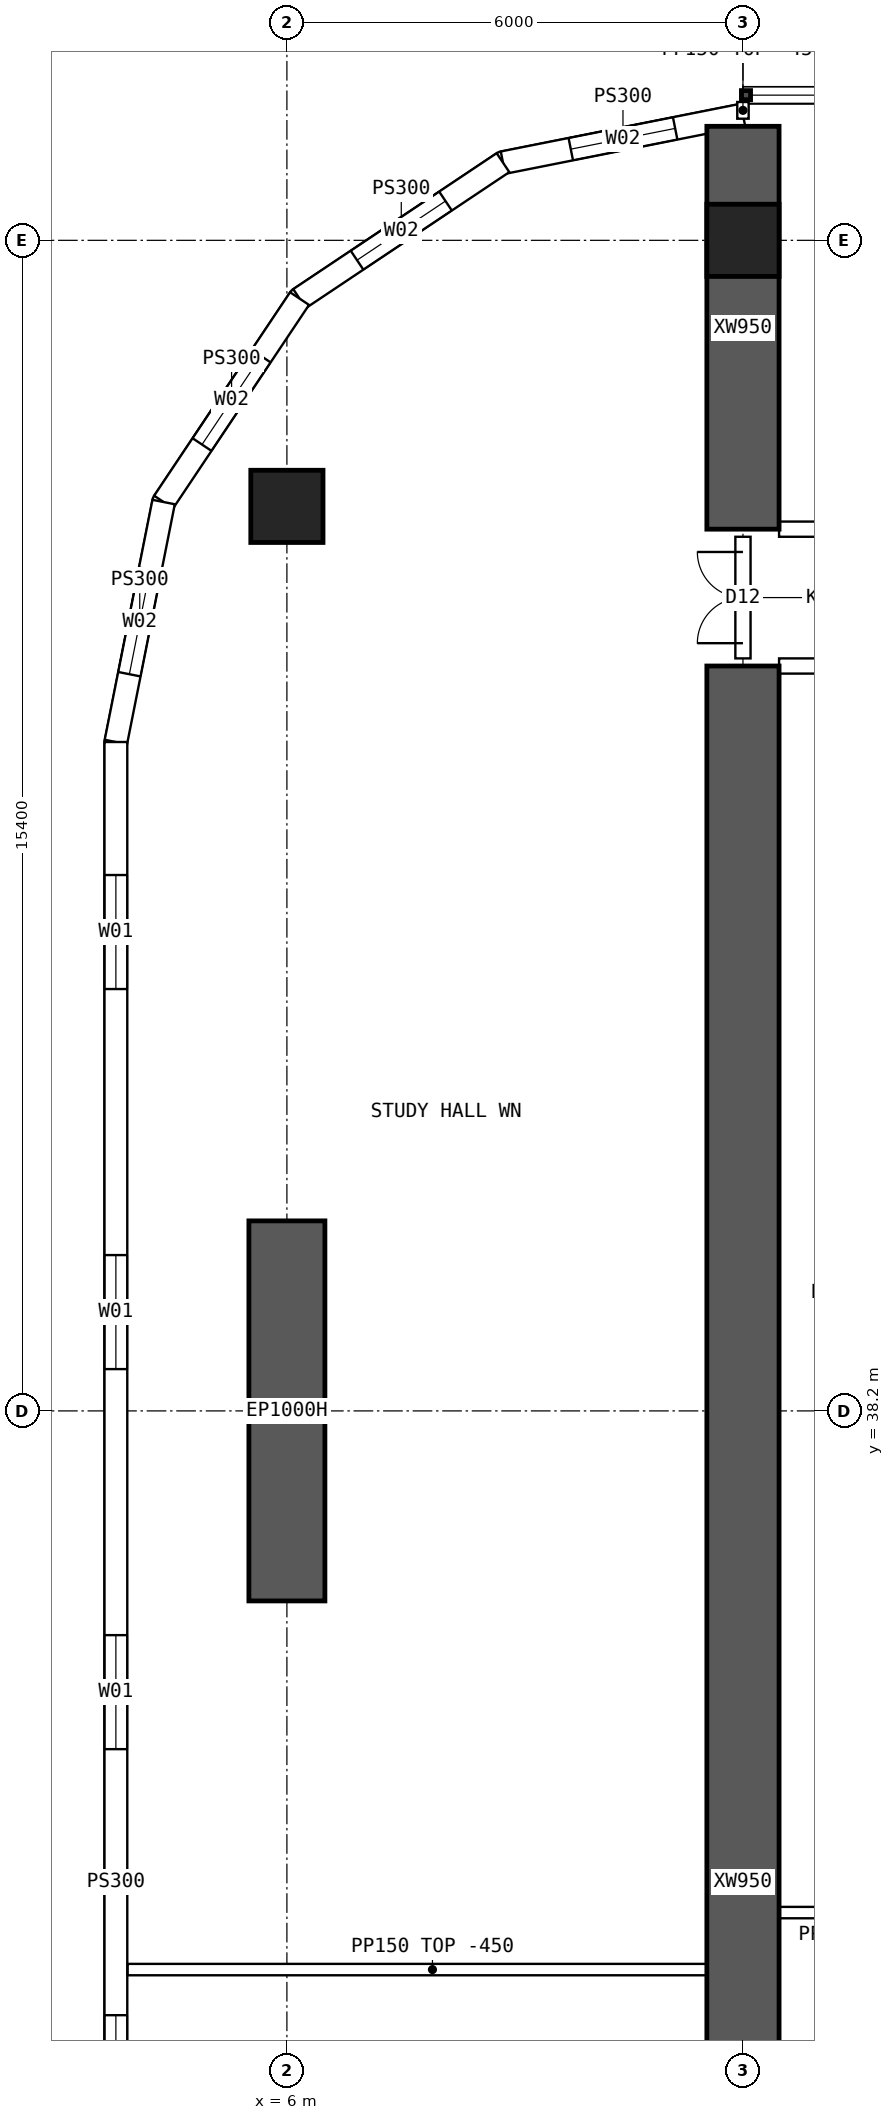
"""IFC4 building model, lengths in metres.
Left out: names, types, materials, properties, quantities, classifications, styles, units other than length and angle.
Written with IfcOpenShell. Run it as: python <this file> out.ifc"""

import sys

from ifc_helpers import new_model, si_unit, direction, frame, frame_2d, origin, origin_2d, place, context, subcontext, project, spatial, polyline, rectangle, hollow_rectangle, outline, extrude, element, fill, save


model = new_model("IFC4")
c1 = context("Model", 3, precision=1e-05, world=origin(), true_north=direction((0.0, 1.0)))
c2 = subcontext(c1, "Body", "Model", "MODEL_VIEW")
j1 = project(units=[si_unit("LENGTHUNIT", "METRE"), si_unit("PLANEANGLEUNIT", "RADIAN")], contexts=[c1])
p1 = place(None, origin())
s1 = spatial("IfcSite", under=j1, at=p1, CompositionType="ELEMENT")
p2 = place(p1, origin())
s2 = spatial("IfcBuilding", under=s1, at=p2, CompositionType="ELEMENT")
p3 = place(p2, frame((0.0, 0.0, 110.65)))
s3 = spatial("IfcBuildingStorey", under=s2, at=p3, CompositionType="ELEMENT", Elevation=110.65)
for number, where, z_axis, x_axis in (
    (1, (12.0, 53.6, 0.0), (0.0, 0.0, 1.0), (1.0, 0.0, 0.0)),
    (2, (6.0, 50.1, 0.0), (0.0, 0.0, 1.0), (1.0, 0.0, 0.0)),
):
    element("IfcColumn", number, at=place(p3, frame(where, z_axis=z_axis, x_axis=x_axis)), inside=s3, PredefinedType="COLUMN", context=c2, shape_type="SweptSolid", body=[
        extrude(hollow_rectangle(XDim=0.95, YDim=0.95, WallThickness=0.095, at=origin_2d()), origin(), (0.0, 0.0, 1.0), 3.75),
    ])
p4 = place(p3, frame((6.0, 35.7, 0.0), z_axis=(0.0, 0.0, 1.0), x_axis=(0.0, 1.0, 0.0)))
e3 = element("IfcWall", 3, at=p4, inside=s3, PredefinedType="SHEAR", context=c2, shape_type="SweptSolid", body=[
    extrude(rectangle(XDim=5.0, YDim=1.0, at=frame_2d((2.5, 0.0))), origin(), (0.0, 0.0, 1.0), 3.75),
])
p5 = place(p3, frame((12.0, 49.8, 0.0), z_axis=(0.0, 0.0, 1.0), x_axis=(0.0, 1.0, 0.0)))
e4 = element("IfcWall", 4, at=p5, inside=s3, PredefinedType="SHEAR", context=c2, shape_type="SweptSolid", body=[
    extrude(rectangle(XDim=5.3, YDim=0.95, at=frame_2d((2.65, 0.0))), origin(), (0.0, 0.0, 1.0), 3.75),
])
p6 = place(p3, frame((12.0, 16.0, 0.0), z_axis=(0.0, 0.0, 1.0), x_axis=(0.0, 1.0, 0.0)))
e5 = element("IfcWall", 5, at=p6, inside=s3, PredefinedType="SHEAR", context=c2, shape_type="SweptSolid", body=[
    extrude(rectangle(XDim=32.0, YDim=0.95, at=frame_2d((16.0, 0.0))), origin(), (0.0, 0.0, 1.0), 3.75),
])
p7 = place(p3, frame((3.75, 47.0, 0.0), z_axis=(0.0, 0.0, 1.0), x_axis=(0.0, -1.0, 0.0)))
e6 = element("IfcWall", 6, at=p7, inside=s3, PredefinedType="SOLIDWALL", context=c2, shape_type="SweptSolid", body=[
    extrude(outline(polyline([(-0.015, -0.15), (30.015, -0.15), (29.985, 0.15), (0.015, 0.15), (-0.015, -0.15)])), origin(), (0.0, 0.0, 1.0), 3.3),
])
p8 = place(p7, frame((1.75, 0.0, 0.9)))
e7 = element("IfcOpeningElement", 7, at=p8, cuts=e6, PredefinedType="OPENING", context=c2, shape_type="SweptSolid", body=[
    extrude(rectangle(XDim=1.5, YDim=2.0, at=frame_2d((0.75, 1.0))), frame((0.0, 0.16, 0.0), z_axis=(0.0, -1.0, 0.0), x_axis=(1.0, 0.0, 0.0)), (0.0, 0.0, 1.0), 0.32),
])
p9 = place(p7, frame((6.75, 0.0, 0.9)))
e8 = element("IfcOpeningElement", 8, at=p9, cuts=e6, PredefinedType="OPENING", context=c2, shape_type="SweptSolid", body=[
    extrude(rectangle(XDim=1.5, YDim=2.0, at=frame_2d((0.75, 1.0))), frame((0.0, 0.16, 0.0), z_axis=(0.0, -1.0, 0.0), x_axis=(1.0, 0.0, 0.0)), (0.0, 0.0, 1.0), 0.32),
])
p10 = place(p7, frame((11.75, 0.0, 0.9)))
e9 = element("IfcOpeningElement", 9, at=p10, cuts=e6, PredefinedType="OPENING", context=c2, shape_type="SweptSolid", body=[
    extrude(rectangle(XDim=1.5, YDim=2.0, at=frame_2d((0.75, 1.0))), frame((0.0, 0.16, 0.0), z_axis=(0.0, -1.0, 0.0), x_axis=(1.0, 0.0, 0.0)), (0.0, 0.0, 1.0), 0.32),
])
p11 = place(p7, frame((16.75, 0.0, 0.9)))
e10 = element("IfcOpeningElement", 10, at=p11, cuts=e6, PredefinedType="OPENING", context=c2, shape_type="SweptSolid", body=[
    extrude(rectangle(XDim=1.5, YDim=2.0, at=frame_2d((0.75, 1.0))), frame((0.0, 0.16, 0.0), z_axis=(0.0, -1.0, 0.0), x_axis=(1.0, 0.0, 0.0)), (0.0, 0.0, 1.0), 0.32),
])
p12 = place(p7, frame((21.75, 0.0, 0.9)))
e11 = element("IfcOpeningElement", 11, at=p12, cuts=e6, PredefinedType="OPENING", context=c2, shape_type="SweptSolid", body=[
    extrude(rectangle(XDim=1.5, YDim=2.0, at=frame_2d((0.75, 1.0))), frame((0.0, 0.16, 0.0), z_axis=(0.0, -1.0, 0.0), x_axis=(1.0, 0.0, 0.0)), (0.0, 0.0, 1.0), 0.32),
])
p13 = place(p7, frame((26.75, 0.0, 0.9)))
e12 = element("IfcOpeningElement", 12, at=p13, cuts=e6, PredefinedType="OPENING", context=c2, shape_type="SweptSolid", body=[
    extrude(rectangle(XDim=1.5, YDim=2.0, at=frame_2d((0.75, 1.0))), frame((0.0, 0.16, 0.0), z_axis=(0.0, -1.0, 0.0), x_axis=(1.0, 0.0, 0.0)), (0.0, 0.0, 1.0), 0.32),
])
p14 = place(p3, frame((12.0, 55.25, 0.0), z_axis=(0.0, 0.0, 1.0), x_axis=(-0.980787251524, -0.195080412259, 0.0)))
e13 = element("IfcWall", 13, at=p14, inside=s3, PredefinedType="SOLIDWALL", context=c2, shape_type="SweptSolid", body=[
    extrude(outline(polyline([(-0.03, -0.15), (3.249, -0.15), (3.189, 0.15), (0.03, 0.15), (-0.03, -0.15)])), origin(), (0.0, 0.0, 1.0), 3.3),
])
p15 = place(p14, frame((0.909, 0.0, 0.9)))
e14 = element("IfcOpeningElement", 14, at=p15, cuts=e13, PredefinedType="OPENING", context=c2, shape_type="SweptSolid", body=[
    extrude(rectangle(XDim=1.4, YDim=1.8, at=frame_2d((0.7, 0.9))), frame((0.0, 0.16, 0.0), z_axis=(0.0, -1.0, 0.0), x_axis=(1.0, 0.0, 0.0)), (0.0, 0.0, 1.0), 0.32),
])
p16 = place(p3, frame((8.843, 54.622, 0.0), z_axis=(0.0, 0.0, 1.0), x_axis=(-0.831443069936, -0.555609954424, 0.0)))
e15 = element("IfcWall", 15, at=p16, inside=s3, PredefinedType="SOLIDWALL", context=c2, shape_type="SweptSolid", body=[
    extrude(outline(polyline([(-0.03, -0.15), (3.249, -0.15), (3.189, 0.15), (0.03, 0.15), (-0.03, -0.15)])), origin(), (0.0, 0.0, 1.0), 3.3),
])
p17 = place(p16, frame((0.909, 0.0, 0.9)))
e16 = element("IfcOpeningElement", 16, at=p17, cuts=e15, PredefinedType="OPENING", context=c2, shape_type="SweptSolid", body=[
    extrude(rectangle(XDim=1.4, YDim=1.8, at=frame_2d((0.7, 0.9))), frame((0.0, 0.16, 0.0), z_axis=(0.0, -1.0, 0.0), x_axis=(1.0, 0.0, 0.0)), (0.0, 0.0, 1.0), 0.32),
])
p18 = place(p3, frame((6.167, 52.833, 0.0), z_axis=(0.0, 0.0, 1.0), x_axis=(-0.555609954424, -0.831443069936, 0.0)))
e17 = element("IfcWall", 17, at=p18, inside=s3, PredefinedType="SOLIDWALL", context=c2, shape_type="SweptSolid", body=[
    extrude(outline(polyline([(-0.03, -0.15), (3.249, -0.15), (3.189, 0.15), (0.03, 0.15), (-0.03, -0.15)])), origin(), (0.0, 0.0, 1.0), 3.3),
])
p19 = place(p18, frame((0.909, 0.0, 0.9)))
e18 = element("IfcOpeningElement", 18, at=p19, cuts=e17, PredefinedType="OPENING", context=c2, shape_type="SweptSolid", body=[
    extrude(rectangle(XDim=1.4, YDim=1.8, at=frame_2d((0.7, 0.9))), frame((0.0, 0.16, 0.0), z_axis=(0.0, -1.0, 0.0), x_axis=(1.0, 0.0, 0.0)), (0.0, 0.0, 1.0), 0.32),
])
p20 = place(p3, frame((4.378, 50.157, 0.0), z_axis=(0.0, 0.0, 1.0), x_axis=(-0.195080412259, -0.980787251524, 0.0)))
e19 = element("IfcWall", 19, at=p20, inside=s3, PredefinedType="SOLIDWALL", context=c2, shape_type="SweptSolid", body=[
    extrude(outline(polyline([(-0.03, -0.15), (3.234, -0.15), (3.204, 0.15), (0.03, 0.15), (-0.03, -0.15)])), origin(), (0.0, 0.0, 1.0), 3.3),
])
p21 = place(p20, frame((0.909, 0.0, 0.9)))
e20 = element("IfcOpeningElement", 20, at=p21, cuts=e19, PredefinedType="OPENING", context=c2, shape_type="SweptSolid", body=[
    extrude(rectangle(XDim=1.4, YDim=1.8, at=frame_2d((0.7, 0.9))), frame((0.0, 0.16, 0.0), z_axis=(0.0, -1.0, 0.0), x_axis=(1.0, 0.0, 0.0)), (0.0, 0.0, 1.0), 0.32),
])
p22 = place(p3, frame((12.475, 49.8, 0.0), z_axis=(0.0, 0.0, 1.0), x_axis=(1.0, 0.0, 0.0)))
e21 = element("IfcWall", 21, at=p22, inside=s3, PredefinedType="SOLIDWALL", context=c2, shape_type="SweptSolid", body=[
    extrude(outline(polyline([(0.0, 0.0), (5.05, 0.0), (5.05, 2.9), (0.0, 2.9), (0.0, 0.0)])), frame((0.0, 0.1, 0.0), z_axis=(0.0, -1.0, 0.0), x_axis=(1.0, 0.0, 0.0)), (0.0, 0.0, 1.0), 0.2),
])
p23 = place(p22, frame((0.6, 0.0, 0.0)))
e22 = element("IfcOpeningElement", 22, at=p23, cuts=e21, PredefinedType="OPENING", context=c2, shape_type="SweptSolid", body=[
    extrude(rectangle(XDim=1.0, YDim=2.1, at=frame_2d((0.5, 1.05))), frame((0.0, 0.11, 0.0), z_axis=(0.0, -1.0, 0.0), x_axis=(1.0, 0.0, 0.0)), (0.0, 0.0, 1.0), 0.22),
])
p24 = place(p3, frame((12.475, 48.0, 0.0), z_axis=(0.0, 0.0, 1.0), x_axis=(1.0, 0.0, 0.0)))
e23 = element("IfcWall", 23, at=p24, inside=s3, PredefinedType="SOLIDWALL", context=c2, shape_type="SweptSolid", body=[
    extrude(rectangle(XDim=5.05, YDim=0.2, at=frame_2d((2.525, 0.0))), origin(), (0.0, 0.0, 1.0), 3.3),
])
p25 = place(p24, frame((3.325, 0.0, 0.0)))
e24 = element("IfcOpeningElement", 24, at=p25, cuts=e23, PredefinedType="OPENING", context=c2, shape_type="SweptSolid", body=[
    extrude(rectangle(XDim=1.6, YDim=2.1, at=frame_2d((0.8, 1.05))), frame((0.0, 0.11, 0.0), z_axis=(0.0, -1.0, 0.0), x_axis=(1.0, 0.0, 0.0)), (0.0, 0.0, 1.0), 0.22),
])
p26 = place(p3, frame((12.0, 31.6, 0.0), z_axis=(0.0, 0.0, 1.0), x_axis=(1.0, 0.0, 0.0)))
e25 = element("IfcWall", 25, at=p26, inside=s3, PredefinedType="PARTITIONING", context=c2, shape_type="SweptSolid", body=[
    extrude(rectangle(XDim=3.6, YDim=0.15, at=frame_2d((1.8, 0.0))), origin(), (0.0, 0.0, 1.0), 3.3),
])
p27 = place(p3, frame((3.905, 30.85, 0.0), z_axis=(0.0, 0.0, 1.0), x_axis=(1.0, 0.0, 0.0)))
e26 = element("IfcWall", 26, at=p27, inside=s3, PredefinedType="PARTITIONING", context=c2, shape_type="SweptSolid", body=[
    extrude(outline(polyline([(0.0, 0.0), (8.02, 0.0), (8.02, 3.3), (2.397, 3.3), (2.395, 2.85), (1.797, 2.85), (1.795, 3.3), (0.0, 3.3), (0.0, 0.0)])), frame((0.0, 0.075, 0.0), z_axis=(0.0, -1.0, 0.0), x_axis=(1.0, 0.0, 0.0)), (0.0, 0.0, 1.0), 0.15),
])
p28 = place(p3, frame((12.0, 48.1, 0.0), z_axis=(0.0, 0.0, 1.0), x_axis=(0.0, 1.0, 0.0)))
e27 = element("IfcWall", 27, at=p28, inside=s3, PredefinedType="SOLIDWALL", context=c2, shape_type="SweptSolid", body=[
    extrude(outline(polyline([(0.0, 0.0), (1.6, 0.0), (1.6, 2.9), (0.0, 2.9), (0.0, 0.0)])), frame((0.0, 0.1, 0.0), z_axis=(0.0, -1.0, 0.0), x_axis=(1.0, 0.0, 0.0)), (0.0, 0.0, 1.0), 0.2),
])
p29 = place(p28, frame((0.2, 0.0, 0.0)))
e28 = element("IfcOpeningElement", 28, at=p29, cuts=e27, PredefinedType="OPENING", context=c2, shape_type="SweptSolid", body=[
    extrude(rectangle(XDim=1.2, YDim=2.1, at=frame_2d((0.6, 1.05))), frame((0.0, 0.11, 0.0), z_axis=(0.0, -1.0, 0.0), x_axis=(1.0, 0.0, 0.0)), (0.0, 0.0, 1.0), 0.22),
])
p30 = place(p3, frame((12.0, 55.2, 0.0), z_axis=(0.0, 0.0, 1.0), x_axis=(0.0, 1.0, 0.0)))
e29 = element("IfcWall", 29, at=p30, inside=s3, PredefinedType="PARTITIONING", context=c2, shape_type="SweptSolid", body=[
    extrude(rectangle(XDim=0.22, YDim=0.15, at=frame_2d((0.11, 0.0))), origin(), (0.0, 0.0, 1.0), 3.3),
])
p31 = place(p8, origin())
e30 = element("IfcWindow", 30, at=p31, inside=s3, PartitioningType="SINGLE_PANEL", PredefinedType="WINDOW", context=c2, shape_type="SweptSolid", body=[
    extrude(rectangle(XDim=1.5, YDim=2.0, at=frame_2d((0.75, 1.0))), frame((0.0, 0.03, 0.0), z_axis=(0.0, -1.0, 0.0), x_axis=(1.0, 0.0, 0.0)), (0.0, 0.0, 1.0), 0.06),
])
fill(e7, e30)
p32 = place(p9, origin())
e31 = element("IfcWindow", 31, at=p32, inside=s3, PartitioningType="SINGLE_PANEL", PredefinedType="WINDOW", context=c2, shape_type="SweptSolid", body=[
    extrude(rectangle(XDim=1.5, YDim=2.0, at=frame_2d((0.75, 1.0))), frame((0.0, 0.03, 0.0), z_axis=(0.0, -1.0, 0.0), x_axis=(1.0, 0.0, 0.0)), (0.0, 0.0, 1.0), 0.06),
])
fill(e8, e31)
p33 = place(p10, origin())
e32 = element("IfcWindow", 32, at=p33, inside=s3, PartitioningType="SINGLE_PANEL", PredefinedType="WINDOW", context=c2, shape_type="SweptSolid", body=[
    extrude(rectangle(XDim=1.5, YDim=2.0, at=frame_2d((0.75, 1.0))), frame((0.0, 0.03, 0.0), z_axis=(0.0, -1.0, 0.0), x_axis=(1.0, 0.0, 0.0)), (0.0, 0.0, 1.0), 0.06),
])
fill(e9, e32)
p34 = place(p11, origin())
e33 = element("IfcWindow", 33, at=p34, inside=s3, PartitioningType="SINGLE_PANEL", PredefinedType="WINDOW", context=c2, shape_type="SweptSolid", body=[
    extrude(rectangle(XDim=1.5, YDim=2.0, at=frame_2d((0.75, 1.0))), frame((0.0, 0.03, 0.0), z_axis=(0.0, -1.0, 0.0), x_axis=(1.0, 0.0, 0.0)), (0.0, 0.0, 1.0), 0.06),
])
fill(e10, e33)
p35 = place(p15, origin())
e34 = element("IfcWindow", 34, at=p35, inside=s3, PartitioningType="SINGLE_PANEL", PredefinedType="WINDOW", context=c2, shape_type="SweptSolid", body=[
    extrude(rectangle(XDim=1.4, YDim=1.8, at=frame_2d((0.7, 0.9))), frame((0.0, 0.03, 0.0), z_axis=(0.0, -1.0, 0.0), x_axis=(1.0, 0.0, 0.0)), (0.0, 0.0, 1.0), 0.06),
])
fill(e14, e34)
p36 = place(p17, origin())
e35 = element("IfcWindow", 35, at=p36, inside=s3, PartitioningType="SINGLE_PANEL", PredefinedType="WINDOW", context=c2, shape_type="SweptSolid", body=[
    extrude(rectangle(XDim=1.4, YDim=1.8, at=frame_2d((0.7, 0.9))), frame((0.0, 0.03, 0.0), z_axis=(0.0, -1.0, 0.0), x_axis=(1.0, 0.0, 0.0)), (0.0, 0.0, 1.0), 0.06),
])
fill(e16, e35)
p37 = place(p19, origin())
e36 = element("IfcWindow", 36, at=p37, inside=s3, PartitioningType="SINGLE_PANEL", PredefinedType="WINDOW", context=c2, shape_type="SweptSolid", body=[
    extrude(rectangle(XDim=1.4, YDim=1.8, at=frame_2d((0.7, 0.9))), frame((0.0, 0.03, 0.0), z_axis=(0.0, -1.0, 0.0), x_axis=(1.0, 0.0, 0.0)), (0.0, 0.0, 1.0), 0.06),
])
fill(e18, e36)
p38 = place(p21, origin())
e37 = element("IfcWindow", 37, at=p38, inside=s3, PartitioningType="SINGLE_PANEL", PredefinedType="WINDOW", context=c2, shape_type="SweptSolid", body=[
    extrude(rectangle(XDim=1.4, YDim=1.8, at=frame_2d((0.7, 0.9))), frame((0.0, 0.03, 0.0), z_axis=(0.0, -1.0, 0.0), x_axis=(1.0, 0.0, 0.0)), (0.0, 0.0, 1.0), 0.06),
])
fill(e20, e37)
p39 = place(p29, origin())
e38 = element("IfcDoor", 38, at=p39, inside=s3, OperationType="DOUBLE_DOOR_SINGLE_SWING", PredefinedType="DOOR", context=c2, shape_type="SweptSolid", body=[
    extrude(rectangle(XDim=1.2, YDim=2.1, at=frame_2d((0.6, 1.05))), frame((0.0, 0.025, 0.0), z_axis=(0.0, -1.0, 0.0), x_axis=(1.0, 0.0, 0.0)), (0.0, 0.0, 1.0), 0.05),
])
fill(e28, e38)
save(model, sys.argv[1])
